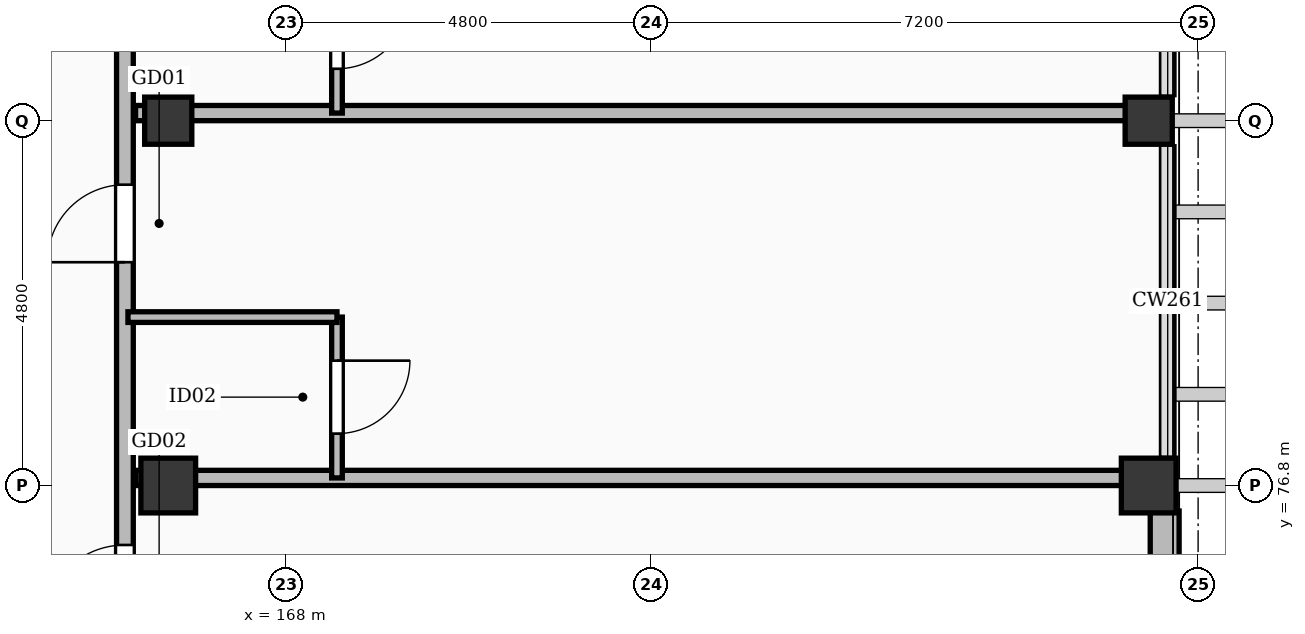
"""IFC4 building model, lengths in metres.
Left out: names, types, materials, properties, quantities, classifications, styles, units other than length and angle.
Written with IfcOpenShell. Run it as: python <this file> out.ifc"""

import sys

from ifc_helpers import new_model, si_unit, direction, frame, frame_2d, origin, origin_2d, place, context, subcontext, project, spatial, rectangle, extrude, element, fill, save


model = new_model("IFC4")
c1 = context("Model", 3, precision=1e-05, world=origin(), true_north=direction((0.0, 1.0)))
c2 = subcontext(c1, "Body", "Model", "MODEL_VIEW")
j1 = project(units=[si_unit("LENGTHUNIT", "METRE"), si_unit("PLANEANGLEUNIT", "RADIAN")], contexts=[c1])
p1 = place(None, origin())
s1 = spatial("IfcSite", under=j1, at=p1, CompositionType="ELEMENT")
p2 = place(p1, origin())
s2 = spatial("IfcBuilding", under=s1, at=p2, CompositionType="ELEMENT")
p3 = place(p2, frame((0.0, 0.0, 31.8)))
s3 = spatial("IfcBuildingStorey", under=s2, at=p3, CompositionType="ELEMENT", Elevation=31.8)
for number, where, z_axis, x_axis in (
    (1, (166.45, 76.8, 0.0), (0.0, 0.0, 1.0), (1.0, 0.0, 0.0)),
    (2, (179.35, 76.8, 0.0), (0.0, 0.0, 1.0), (1.0, 0.0, 0.0)),
):
    element("IfcColumn", number, at=place(p3, frame(where, z_axis=z_axis, x_axis=x_axis)), inside=s3, PredefinedType="COLUMN", context=c2, shape_type="SweptSolid", body=[
        extrude(rectangle(XDim=0.72, YDim=0.72, at=origin_2d()), origin(), (0.0, 0.0, 1.0), 3.6),
    ])
for number, where, z_axis, x_axis in (
    (3, (166.45, 81.6, 0.0), (0.0, 0.0, 1.0), (1.0, 0.0, 0.0)),
    (4, (179.35, 81.6, 0.0), (0.0, 0.0, 1.0), (1.0, 0.0, 0.0)),
):
    element("IfcColumn", number, at=place(p3, frame(where, z_axis=z_axis, x_axis=x_axis)), inside=s3, PredefinedType="COLUMN", context=c2, shape_type="SweptSolid", body=[
        extrude(rectangle(XDim=0.62, YDim=0.62, at=origin_2d()), origin(), (0.0, 0.0, 1.0), 3.6),
    ])
p4 = place(p3, frame((179.56, 76.465, 0.0), z_axis=(0.0, 0.0, 1.0), x_axis=(0.0, -1.0, 0.0)))
e5 = element("IfcWall", 5, at=p4, inside=s3, PredefinedType="SOLIDWALL", context=c2, shape_type="SweptSolid", body=[
    extrude(rectangle(XDim=4.18, YDim=0.38, at=frame_2d((2.09, 0.0))), origin(), (0.0, 0.0, 1.0), 2.602),
])
p5 = place(p4, frame((1.34, 0.0, 0.55)))
e6 = element("IfcOpeningElement", 6, at=p5, cuts=e5, PredefinedType="OPENING", context=c2, shape_type="SweptSolid", body=[
    extrude(rectangle(XDim=1.5, YDim=1.74, at=frame_2d((0.75, 0.87))), frame((0.0, 0.202, 0.0), z_axis=(0.0, -1.0, 0.0), x_axis=(1.0, 0.0, 0.0)), (0.0, 0.0, 1.0), 0.404),
])
p6 = place(p3, frame((165.88, 48.35, 0.0), z_axis=(0.0, 0.0, 1.0), x_axis=(0.0, 1.0, 0.0)))
e7 = element("IfcWall", 7, at=p6, inside=s3, PredefinedType="PARTITIONING", context=c2, shape_type="SweptSolid", body=[
    extrude(rectangle(XDim=77.3, YDim=0.22, at=frame_2d((38.65, 0.0))), origin(), (0.0, 0.0, 1.0), 2.602),
])
p7 = place(p6, frame((5.15, 0.0, 0.0)))
e8 = element("IfcOpeningElement", 8, at=p7, cuts=e7, PredefinedType="OPENING", context=c2, shape_type="SweptSolid", body=[
    extrude(rectangle(XDim=1.14, YDim=2.26, at=frame_2d((0.57, 1.13))), frame((0.0, 0.122, 0.0), z_axis=(0.0, -1.0, 0.0), x_axis=(1.0, 0.0, 0.0)), (0.0, 0.0, 1.0), 0.244),
])
p8 = place(p6, frame((12.188, 0.0, 0.0)))
e9 = element("IfcOpeningElement", 9, at=p8, cuts=e7, PredefinedType="OPENING", context=c2, shape_type="SweptSolid", body=[
    extrude(rectangle(XDim=1.12, YDim=2.15, at=frame_2d((0.56, 1.075))), frame((0.0, 0.122, 0.0), z_axis=(0.0, -1.0, 0.0), x_axis=(1.0, 0.0, 0.0)), (0.0, 0.0, 1.0), 0.244),
])
p9 = place(p6, frame((16.988, 0.0, 0.0)))
e10 = element("IfcOpeningElement", 10, at=p9, cuts=e7, PredefinedType="OPENING", context=c2, shape_type="SweptSolid", body=[
    extrude(rectangle(XDim=1.28, YDim=2.16, at=frame_2d((0.64, 1.08))), frame((0.0, 0.122, 0.0), z_axis=(0.0, -1.0, 0.0), x_axis=(1.0, 0.0, 0.0)), (0.0, 0.0, 1.0), 0.244),
])
p10 = place(p6, frame((21.788, 0.0, 0.0)))
e11 = element("IfcOpeningElement", 11, at=p10, cuts=e7, PredefinedType="OPENING", context=c2, shape_type="SweptSolid", body=[
    extrude(rectangle(XDim=1.05, YDim=2.18, at=frame_2d((0.525, 1.09))), frame((0.0, 0.122, 0.0), z_axis=(0.0, -1.0, 0.0), x_axis=(1.0, 0.0, 0.0)), (0.0, 0.0, 1.0), 0.244),
])
p11 = place(p6, frame((26.588, 0.0, 0.0)))
e12 = element("IfcOpeningElement", 12, at=p11, cuts=e7, PredefinedType="OPENING", context=c2, shape_type="SweptSolid", body=[
    extrude(rectangle(XDim=1.08, YDim=2.25, at=frame_2d((0.54, 1.125))), frame((0.0, 0.122, 0.0), z_axis=(0.0, -1.0, 0.0), x_axis=(1.0, 0.0, 0.0)), (0.0, 0.0, 1.0), 0.244),
])
p12 = place(p6, frame((31.388, 0.0, 0.0)))
e13 = element("IfcOpeningElement", 13, at=p12, cuts=e7, PredefinedType="OPENING", context=c2, shape_type="SweptSolid", body=[
    extrude(rectangle(XDim=1.02, YDim=2.2, at=frame_2d((0.51, 1.1))), frame((0.0, 0.122, 0.0), z_axis=(0.0, -1.0, 0.0), x_axis=(1.0, 0.0, 0.0)), (0.0, 0.0, 1.0), 0.244),
])
p13 = place(p6, frame((35.838, 0.0, 0.0)))
e14 = element("IfcOpeningElement", 14, at=p13, cuts=e7, PredefinedType="OPENING", context=c2, shape_type="SweptSolid", body=[
    extrude(rectangle(XDim=1.5, YDim=2.3, at=frame_2d((0.75, 1.15))), frame((0.0, 0.122, 0.0), z_axis=(0.0, -1.0, 0.0), x_axis=(1.0, 0.0, 0.0)), (0.0, 0.0, 1.0), 0.244),
])
p14 = place(p6, frame((40.988, 0.0, 0.0)))
e15 = element("IfcOpeningElement", 15, at=p14, cuts=e7, PredefinedType="OPENING", context=c2, shape_type="SweptSolid", body=[
    extrude(rectangle(XDim=1.12, YDim=2.15, at=frame_2d((0.56, 1.075))), frame((0.0, 0.122, 0.0), z_axis=(0.0, -1.0, 0.0), x_axis=(1.0, 0.0, 0.0)), (0.0, 0.0, 1.0), 0.244),
])
p15 = place(p6, frame((45.788, 0.0, 0.0)))
e16 = element("IfcOpeningElement", 16, at=p15, cuts=e7, PredefinedType="OPENING", context=c2, shape_type="SweptSolid", body=[
    extrude(rectangle(XDim=1.28, YDim=2.16, at=frame_2d((0.64, 1.08))), frame((0.0, 0.122, 0.0), z_axis=(0.0, -1.0, 0.0), x_axis=(1.0, 0.0, 0.0)), (0.0, 0.0, 1.0), 0.244),
])
p16 = place(p6, frame((50.588, 0.0, 0.0)))
e17 = element("IfcOpeningElement", 17, at=p16, cuts=e7, PredefinedType="OPENING", context=c2, shape_type="SweptSolid", body=[
    extrude(rectangle(XDim=1.05, YDim=2.18, at=frame_2d((0.525, 1.09))), frame((0.0, 0.122, 0.0), z_axis=(0.0, -1.0, 0.0), x_axis=(1.0, 0.0, 0.0)), (0.0, 0.0, 1.0), 0.244),
])
p17 = place(p6, frame((55.388, 0.0, 0.0)))
e18 = element("IfcOpeningElement", 18, at=p17, cuts=e7, PredefinedType="OPENING", context=c2, shape_type="SweptSolid", body=[
    extrude(rectangle(XDim=1.08, YDim=2.25, at=frame_2d((0.54, 1.125))), frame((0.0, 0.122, 0.0), z_axis=(0.0, -1.0, 0.0), x_axis=(1.0, 0.0, 0.0)), (0.0, 0.0, 1.0), 0.244),
])
p18 = place(p6, frame((60.188, 0.0, 0.0)))
e19 = element("IfcOpeningElement", 19, at=p18, cuts=e7, PredefinedType="OPENING", context=c2, shape_type="SweptSolid", body=[
    extrude(rectangle(XDim=1.02, YDim=2.2, at=frame_2d((0.51, 1.1))), frame((0.0, 0.122, 0.0), z_axis=(0.0, -1.0, 0.0), x_axis=(1.0, 0.0, 0.0)), (0.0, 0.0, 1.0), 0.244),
])
p19 = place(p6, frame((64.638, 0.0, 0.0)))
e20 = element("IfcOpeningElement", 20, at=p19, cuts=e7, PredefinedType="OPENING", context=c2, shape_type="SweptSolid", body=[
    extrude(rectangle(XDim=1.5, YDim=2.3, at=frame_2d((0.75, 1.15))), frame((0.0, 0.122, 0.0), z_axis=(0.0, -1.0, 0.0), x_axis=(1.0, 0.0, 0.0)), (0.0, 0.0, 1.0), 0.244),
])
p20 = place(p6, frame((69.788, 0.0, 0.0)))
e21 = element("IfcOpeningElement", 21, at=p20, cuts=e7, PredefinedType="OPENING", context=c2, shape_type="SweptSolid", body=[
    extrude(rectangle(XDim=1.12, YDim=2.15, at=frame_2d((0.56, 1.075))), frame((0.0, 0.122, 0.0), z_axis=(0.0, -1.0, 0.0), x_axis=(1.0, 0.0, 0.0)), (0.0, 0.0, 1.0), 0.244),
])
p21 = place(p6, frame((74.588, 0.0, 0.0)))
e22 = element("IfcOpeningElement", 22, at=p21, cuts=e7, PredefinedType="OPENING", context=c2, shape_type="SweptSolid", body=[
    extrude(rectangle(XDim=1.28, YDim=2.16, at=frame_2d((0.64, 1.08))), frame((0.0, 0.122, 0.0), z_axis=(0.0, -1.0, 0.0), x_axis=(1.0, 0.0, 0.0)), (0.0, 0.0, 1.0), 0.244),
])
p22 = place(p3, frame((166.02, 76.9, 0.0), z_axis=(0.0, 0.0, 1.0), x_axis=(1.0, 0.0, 0.0)))
e23 = element("IfcWall", 23, at=p22, inside=s3, PredefinedType="PARTITIONING", context=c2, shape_type="SweptSolid", body=[
    extrude(rectangle(XDim=13.23, YDim=0.2, at=frame_2d((6.615, 0.0))), origin(), (0.0, 0.0, 1.0), 2.602),
])
p23 = place(p3, frame((168.67, 76.9, 0.0), z_axis=(0.0, 0.0, 1.0), x_axis=(0.0, 1.0, 0.0)))
e24 = element("IfcWall", 24, at=p23, inside=s3, PredefinedType="PARTITIONING", context=c2, shape_type="SweptSolid", body=[
    extrude(rectangle(XDim=2.116, YDim=0.14, at=frame_2d((1.058, 0.0))), origin(), (0.0, 0.0, 1.0), 2.732),
])
p24 = place(p23, frame((0.583, 0.0, 0.0)))
e25 = element("IfcOpeningElement", 25, at=p24, cuts=e24, PredefinedType="OPENING", context=c2, shape_type="SweptSolid", body=[
    extrude(rectangle(XDim=0.96, YDim=2.12, at=frame_2d((0.48, 1.06))), frame((0.0, 0.082, 0.0), z_axis=(0.0, -1.0, 0.0), x_axis=(1.0, 0.0, 0.0)), (0.0, 0.0, 1.0), 0.164),
])
p25 = place(p3, frame((165.92, 79.016, 0.0), z_axis=(0.0, 0.0, 1.0), x_axis=(1.0, 0.0, 0.0)))
e26 = element("IfcWall", 26, at=p25, inside=s3, PredefinedType="PARTITIONING", context=c2, shape_type="SweptSolid", body=[
    extrude(rectangle(XDim=2.75, YDim=0.14, at=frame_2d((1.375, 0.0))), origin(), (0.0, 0.0, 1.0), 2.732),
])
p26 = place(p3, frame((166.02, 81.7, 0.0), z_axis=(0.0, 0.0, 1.0), x_axis=(1.0, 0.0, 0.0)))
e27 = element("IfcWall", 27, at=p26, inside=s3, PredefinedType="PARTITIONING", context=c2, shape_type="SweptSolid", body=[
    extrude(rectangle(XDim=13.23, YDim=0.2, at=frame_2d((6.615, 0.0))), origin(), (0.0, 0.0, 1.0), 2.602),
])
p27 = place(p3, frame((168.67, 81.7, 0.0), z_axis=(0.0, 0.0, 1.0), x_axis=(0.0, 1.0, 0.0)))
e28 = element("IfcWall", 28, at=p27, inside=s3, PredefinedType="PARTITIONING", context=c2, shape_type="SweptSolid", body=[
    extrude(rectangle(XDim=2.116, YDim=0.14, at=frame_2d((1.058, 0.0))), origin(), (0.0, 0.0, 1.0), 2.732),
])
p28 = place(p27, frame((0.583, 0.0, 0.0)))
e29 = element("IfcOpeningElement", 29, at=p28, cuts=e28, PredefinedType="OPENING", context=c2, shape_type="SweptSolid", body=[
    extrude(rectangle(XDim=0.96, YDim=2.12, at=frame_2d((0.48, 1.06))), frame((0.0, 0.082, 0.0), z_axis=(0.0, -1.0, 0.0), x_axis=(1.0, 0.0, 0.0)), (0.0, 0.0, 1.0), 0.164),
])
p29 = place(p11, origin())
e30 = element("IfcDoor", 30, at=p29, inside=s3, OperationType="SINGLE_SWING_LEFT", PredefinedType="DOOR", context=c2, shape_type="SweptSolid", body=[
    extrude(rectangle(XDim=1.08, YDim=2.25, at=frame_2d((0.54, 1.125))), frame((0.0, 0.025, 0.0), z_axis=(0.0, -1.0, 0.0), x_axis=(1.0, 0.0, 0.0)), (0.0, 0.0, 1.0), 0.05),
])
fill(e12, e30)
p30 = place(p12, origin())
e31 = element("IfcDoor", 31, at=p30, inside=s3, OperationType="SINGLE_SWING_LEFT", PredefinedType="DOOR", context=c2, shape_type="SweptSolid", body=[
    extrude(rectangle(XDim=1.02, YDim=2.2, at=frame_2d((0.51, 1.1))), frame((0.0, 0.025, 0.0), z_axis=(0.0, -1.0, 0.0), x_axis=(1.0, 0.0, 0.0)), (0.0, 0.0, 1.0), 0.05),
])
fill(e13, e31)
p31 = place(p24, frame((0.96, 0.0, 0.0), z_axis=(0.0, 0.0, 1.0), x_axis=(-1.0, 0.0, 0.0)))
e32 = element("IfcDoor", 32, at=p31, inside=s3, OperationType="SINGLE_SWING_RIGHT", PredefinedType="DOOR", context=c2, shape_type="SweptSolid", body=[
    extrude(rectangle(XDim=0.96, YDim=2.12, at=frame_2d((0.48, 1.06))), frame((0.0, 0.025, 0.0), z_axis=(0.0, -1.0, 0.0), x_axis=(1.0, 0.0, 0.0)), (0.0, 0.0, 1.0), 0.05),
])
fill(e25, e32)
p32 = place(p28, frame((0.96, 0.0, 0.0), z_axis=(0.0, 0.0, 1.0), x_axis=(-1.0, 0.0, 0.0)))
e33 = element("IfcDoor", 33, at=p32, inside=s3, OperationType="SINGLE_SWING_RIGHT", PredefinedType="DOOR", context=c2, shape_type="SweptSolid", body=[
    extrude(rectangle(XDim=0.96, YDim=2.12, at=frame_2d((0.48, 1.06))), frame((0.0, 0.025, 0.0), z_axis=(0.0, -1.0, 0.0), x_axis=(1.0, 0.0, 0.0)), (0.0, 0.0, 1.0), 0.05),
])
fill(e29, e33)
save(model, sys.argv[1])
